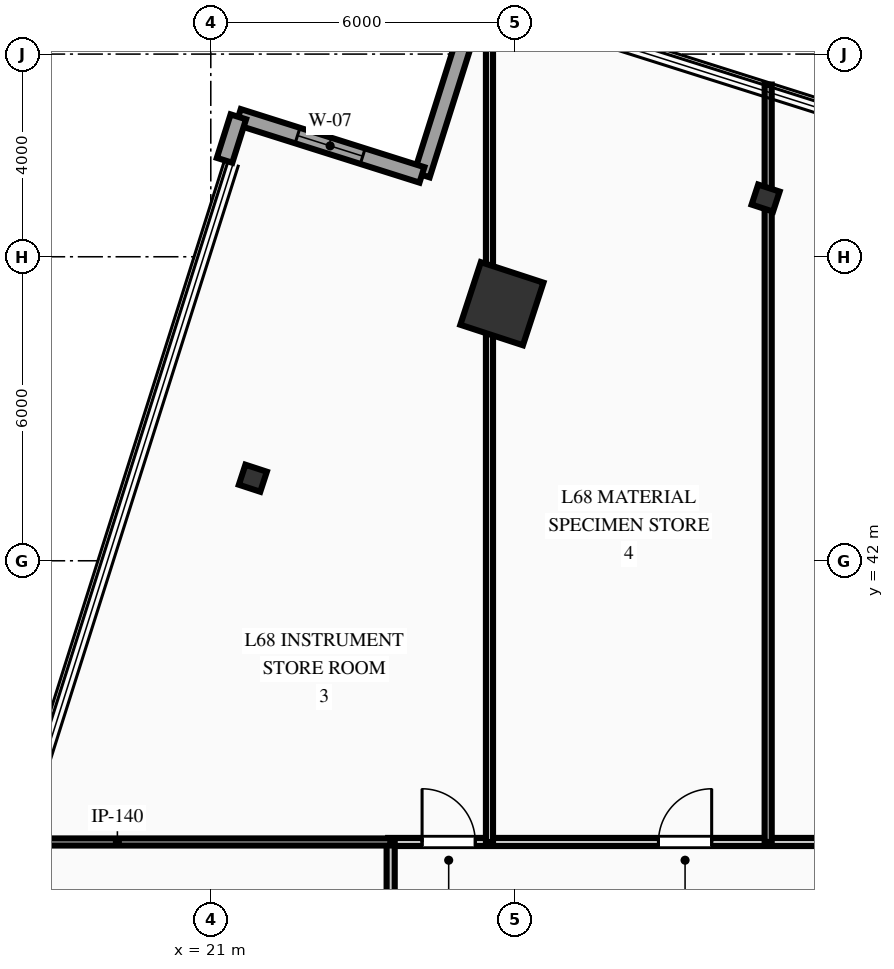
"""IFC4 building model, lengths in metres.
Left out: names, types, materials, properties, quantities, classifications, styles, units other than length and angle.
Written with IfcOpenShell. Run it as: python <this file> out.ifc"""

import sys

from ifc_helpers import new_model, si_unit, direction, frame, frame_2d, origin, origin_2d, place, context, subcontext, project, spatial, rectangle, hollow_rectangle, i_section, extrude, element, fill, save


model = new_model("IFC4")
c1 = context("Model", 3, precision=1e-05, world=origin(), true_north=direction((0.0, 1.0)))
c2 = subcontext(c1, "Body", "Model", "MODEL_VIEW")
j1 = project(units=[si_unit("LENGTHUNIT", "METRE"), si_unit("PLANEANGLEUNIT", "RADIAN")], contexts=[c1])
p1 = place(None, origin())
s1 = spatial("IfcSite", under=j1, at=p1, CompositionType="ELEMENT")
p2 = place(p1, origin())
s2 = spatial("IfcBuilding", under=s1, at=p2, CompositionType="ELEMENT")
p3 = place(p2, frame((0.0, 0.0, 271.2)))
s3 = spatial("IfcBuildingStorey", under=s2, at=p3, CompositionType="ELEMENT", Elevation=271.2)
p4 = place(p3, frame((26.745, 47.073, 0.0), z_axis=(0.0, 0.0, 1.0), x_axis=(0.311008203279, 0.950407227189, 0.0)))
e1 = element("IfcColumn", 1, at=p4, inside=s3, PredefinedType="COLUMN", context=c2, shape_type="SweptSolid", body=[
    extrude(hollow_rectangle(XDim=1.3, YDim=1.3, WallThickness=0.06, at=origin_2d()), origin(), (0.0, 0.0, 1.0), 3.75),
])
for number, where, z_axis, x_axis in (
    (2, (31.949, 49.158, 0.0), (0.0, 0.0, 1.0), (0.311, 0.95, 0.0)),
    (3, (21.83, 43.629, 0.0), (0.0, 0.0, 1.0), (0.311, 0.95, 0.0)),
):
    element("IfcColumn", number, at=place(p3, frame(where, z_axis=z_axis, x_axis=x_axis)), inside=s3, PredefinedType="COLUMN", context=c2, shape_type="SweptSolid", body=[
        extrude(i_section(OverallWidth=0.416, OverallDepth=0.445, WebThickness=0.039, FlangeThickness=0.063, at=origin_2d()), origin(), (0.0, 0.0, 1.0), 3.75),
    ])
p5 = place(p3, frame((25.167, 49.616, 0.0), z_axis=(0.0, 0.0, 1.0), x_axis=(0.301561788886, 0.953446635887, 0.0)))
e4 = element("IfcWall", 4, at=p5, inside=s3, PredefinedType="STANDARD", context=c2, shape_type="SweptSolid", body=[
    extrude(rectangle(XDim=3.8, YDim=0.32, at=frame_2d((1.9, 0.0))), origin(), (0.0, 0.0, 1.0), 3.48),
])
p6 = place(p3, frame((21.544, 50.762, 0.0), z_axis=(0.0, 0.0, 1.0), x_axis=(0.953440793023, -0.301580261621, 0.0)))
e5 = element("IfcWall", 5, at=p6, inside=s3, PredefinedType="STANDARD", context=c2, shape_type="SweptSolid", body=[
    extrude(rectangle(XDim=3.8, YDim=0.32, at=frame_2d((1.9, 0.0))), origin(), (0.0, 0.0, 1.0), 3.48),
])
p7 = place(p6, frame((1.225, 0.0, 0.85)))
e6 = element("IfcOpeningElement", 6, at=p7, cuts=e5, PredefinedType="OPENING", context=c2, shape_type="SweptSolid", body=[
    extrude(rectangle(XDim=1.35, YDim=1.95, at=frame_2d((0.675, 0.975))), frame((0.0, 0.17, 0.0), z_axis=(0.0, -1.0, 0.0), x_axis=(1.0, 0.0, 0.0)), (0.0, 0.0, 1.0), 0.34),
])
p8 = place(p3, frame((21.272, 49.904, 0.0), z_axis=(0.0, 0.0, 1.0), x_axis=(0.301624624899, 0.95342675946, 0.0)))
e7 = element("IfcWall", 7, at=p8, inside=s3, PredefinedType="STANDARD", context=c2, shape_type="SweptSolid", body=[
    extrude(rectangle(XDim=0.9, YDim=0.32, at=frame_2d((0.45, 0.0))), origin(), (0.0, 0.0, 1.0), 3.48),
])
p9 = place(p3, frame((24.5, 36.45, 0.0), z_axis=(0.0, 0.0, 1.0), x_axis=(1.0, 0.0, 0.0)))
e8 = element("IfcWall", 8, at=p9, inside=s3, PredefinedType="PARTITIONING", context=c2, shape_type="SweptSolid", body=[
    extrude(rectangle(XDim=10.25, YDim=0.16, at=frame_2d((5.125, 0.0))), origin(), (0.0, 0.0, 1.0), 3.48),
])
p10 = place(p9, frame((0.67, 0.0, 0.0)))
e9 = element("IfcOpeningElement", 9, at=p10, cuts=e8, PredefinedType="OPENING", context=c2, shape_type="SweptSolid", body=[
    extrude(rectangle(XDim=1.05, YDim=2.15, at=frame_2d((0.525, 1.075))), frame((0.0, 0.09, 0.0), z_axis=(0.0, -1.0, 0.0), x_axis=(1.0, 0.0, 0.0)), (0.0, 0.0, 1.0), 0.18),
])
p11 = place(p9, frame((5.335, 0.0, 0.0)))
e10 = element("IfcOpeningElement", 10, at=p11, cuts=e8, PredefinedType="OPENING", context=c2, shape_type="SweptSolid", body=[
    extrude(rectangle(XDim=1.05, YDim=2.15, at=frame_2d((0.525, 1.075))), frame((0.0, 0.09, 0.0), z_axis=(0.0, -1.0, 0.0), x_axis=(1.0, 0.0, 0.0)), (0.0, 0.0, 1.0), 0.18),
])
p12 = place(p3, frame((24.55, 27.25, 0.0), z_axis=(0.0, 0.0, 1.0), x_axis=(0.0, 1.0, 0.0)))
e11 = element("IfcWall", 11, at=p12, inside=s3, PredefinedType="PARTITIONING", context=c2, shape_type="SweptSolid", body=[
    extrude(rectangle(XDim=9.2, YDim=0.16, at=frame_2d((4.6, 0.0))), origin(), (0.0, 0.0, 1.0), 3.48),
])
p13 = place(p12, frame((6.345, 0.0, 0.0)))
e12 = element("IfcOpeningElement", 12, at=p13, cuts=e11, PredefinedType="OPENING", context=c2, shape_type="SweptSolid", body=[
    extrude(rectangle(XDim=1.05, YDim=2.15, at=frame_2d((0.525, 1.075))), frame((0.0, 0.09, 0.0), z_axis=(0.0, -1.0, 0.0), x_axis=(1.0, 0.0, 0.0)), (0.0, 0.0, 1.0), 0.18),
])
p14 = place(p3, frame((17.06, 36.45, 0.0), z_axis=(0.0, 0.0, 1.0), x_axis=(1.0, 0.0, 0.0)))
e13 = element("IfcWall", 13, at=p14, inside=s3, PredefinedType="PARTITIONING", context=c2, shape_type="SweptSolid", body=[
    extrude(rectangle(XDim=7.49, YDim=0.14, at=frame_2d((3.745, 0.0))), origin(), (0.0, 0.0, 1.0), 3.48),
])
p15 = place(p3, frame((26.5, 36.45, 0.0), z_axis=(0.0, 0.0, 1.0), x_axis=(0.0, 1.0, 0.0)))
e14 = element("IfcWall", 14, at=p15, inside=s3, PredefinedType="PARTITIONING", context=c2, shape_type="SweptSolid", body=[
    extrude(rectangle(XDim=16.688, YDim=0.14, at=frame_2d((8.344, 0.0))), origin(), (0.0, 0.0, 1.0), 2.858),
])
p16 = place(p3, frame((32.0, 36.45, 0.0), z_axis=(0.0, 0.0, 1.0), x_axis=(0.0, 1.0, 0.0)))
e15 = element("IfcWall", 15, at=p16, inside=s3, PredefinedType="PARTITIONING", context=c2, shape_type="SweptSolid", body=[
    extrude(rectangle(XDim=14.948, YDim=0.14, at=frame_2d((7.474, 0.0))), origin(), (0.0, 0.0, 1.0), 2.858),
])
p17 = place(p7, origin())
e16 = element("IfcWindow", 16, at=p17, inside=s3, PartitioningType="SINGLE_PANEL", PredefinedType="WINDOW", context=c2, shape_type="SweptSolid", body=[
    extrude(rectangle(XDim=1.35, YDim=1.95, at=frame_2d((0.675, 0.975))), frame((0.0, 0.03, 0.0), z_axis=(0.0, -1.0, 0.0), x_axis=(1.0, 0.0, 0.0)), (0.0, 0.0, 1.0), 0.06),
])
fill(e6, e16)
p18 = place(p10, origin())
e17 = element("IfcDoor", 17, at=p18, inside=s3, OperationType="SINGLE_SWING_LEFT", PredefinedType="DOOR", context=c2, shape_type="SweptSolid", body=[
    extrude(rectangle(XDim=1.05, YDim=2.15, at=frame_2d((0.525, 1.075))), frame((0.0, 0.025, 0.0), z_axis=(0.0, -1.0, 0.0), x_axis=(1.0, 0.0, 0.0)), (0.0, 0.0, 1.0), 0.05),
])
fill(e9, e17)
p19 = place(p11, origin())
e18 = element("IfcDoor", 18, at=p19, inside=s3, OperationType="SINGLE_SWING_RIGHT", PredefinedType="DOOR", context=c2, shape_type="SweptSolid", body=[
    extrude(rectangle(XDim=1.05, YDim=2.15, at=frame_2d((0.525, 1.075))), frame((0.0, 0.025, 0.0), z_axis=(0.0, -1.0, 0.0), x_axis=(1.0, 0.0, 0.0)), (0.0, 0.0, 1.0), 0.05),
])
fill(e10, e18)
save(model, sys.argv[1])
